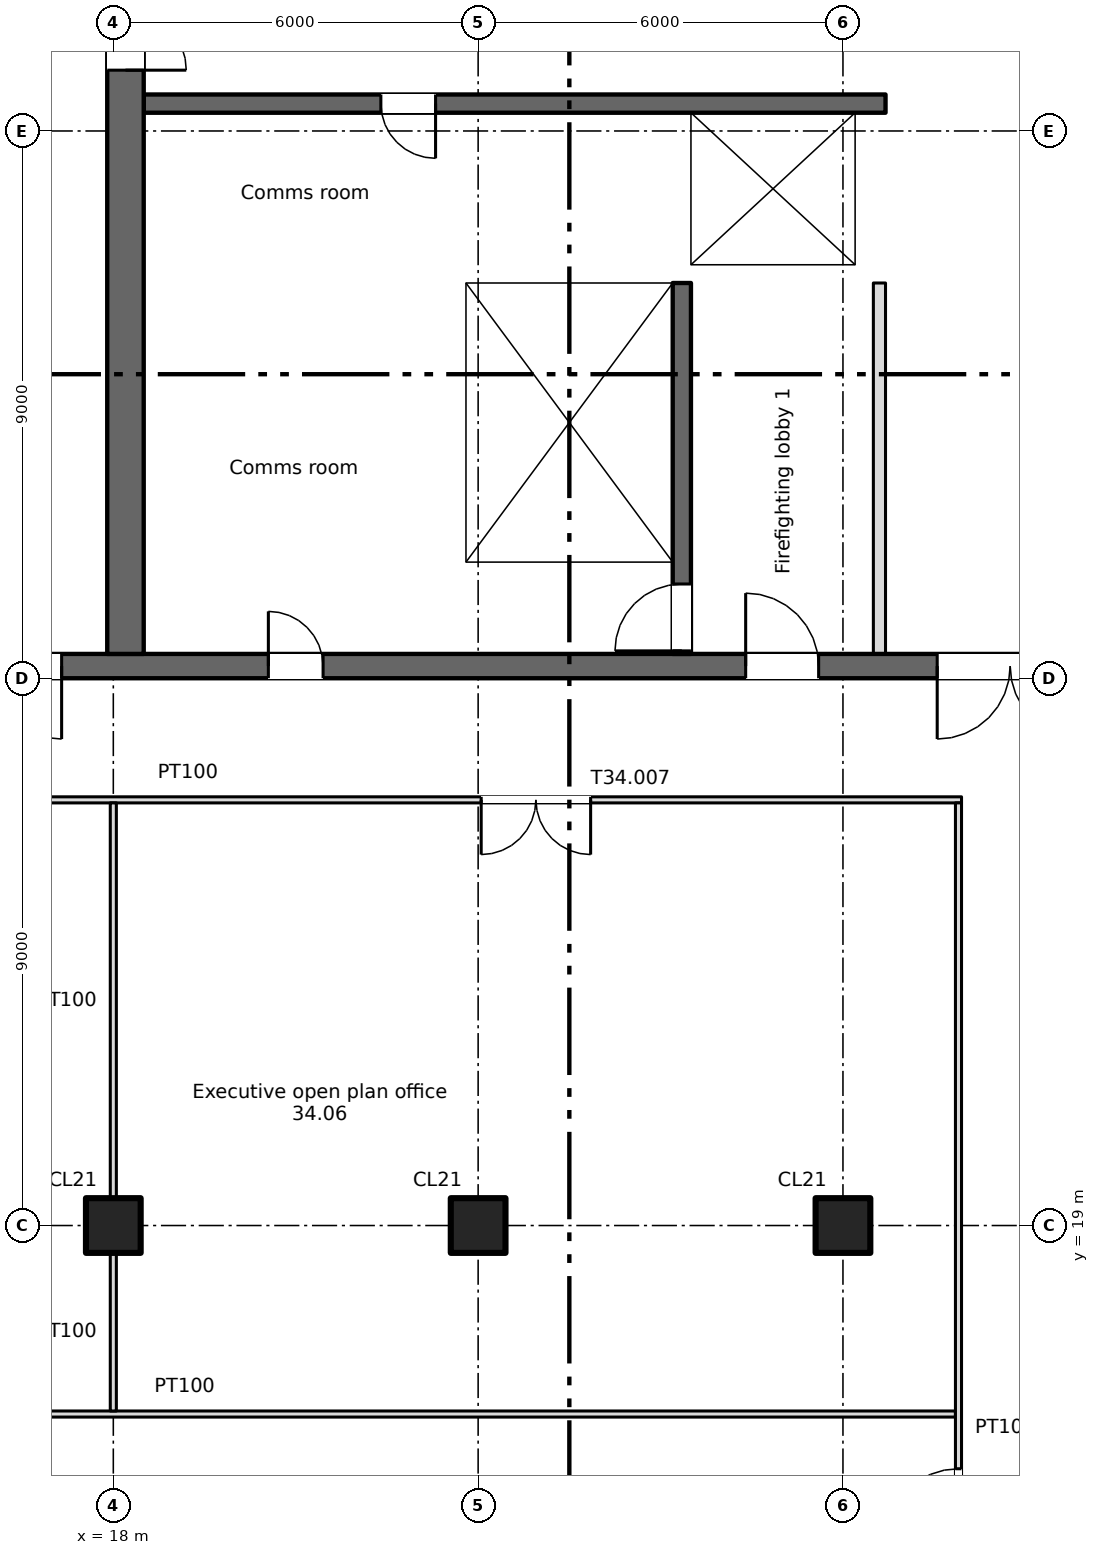
"""IFC4 building model, lengths in metres.
Left out: names, types, materials, properties, quantities, classifications, styles, units other than length and angle.
Written with IfcOpenShell. Run it as: python <this file> out.ifc"""

import sys

from ifc_helpers import new_model, si_unit, direction, frame, frame_2d, origin, origin_2d, place, context, subcontext, project, spatial, rectangle, extrude, element, fill, save


model = new_model("IFC4")
c1 = context("Model", 3, precision=1e-05, world=origin(), true_north=direction((0.0, 1.0)))
c2 = subcontext(c1, "Body", "Model", "MODEL_VIEW")
j1 = project(units=[si_unit("LENGTHUNIT", "METRE"), si_unit("PLANEANGLEUNIT", "RADIAN")], contexts=[c1])
p1 = place(None, origin())
s1 = spatial("IfcSite", under=j1, at=p1, CompositionType="ELEMENT")
p2 = place(p1, origin())
s2 = spatial("IfcBuilding", under=s1, at=p2, CompositionType="ELEMENT")
p3 = place(p2, frame((0.0, 0.0, 239.35)))
s3 = spatial("IfcBuildingStorey", under=s2, at=p3, CompositionType="ELEMENT", Elevation=239.35)
for number, where, z_axis, x_axis in (
    (1, (18.0, 19.0, 0.0), (0.0, 0.0, 1.0), (1.0, 0.0, 0.0)),
    (2, (24.0, 19.0, 0.0), (0.0, 0.0, 1.0), (1.0, 0.0, 0.0)),
    (3, (30.0, 19.0, 0.0), (0.0, 0.0, 1.0), (1.0, 0.0, 0.0)),
):
    element("IfcColumn", number, at=place(p3, frame(where, z_axis=z_axis, x_axis=x_axis)), inside=s3, PredefinedType="COLUMN", context=c2, shape_type="SweptSolid", body=[
        extrude(rectangle(XDim=0.9, YDim=0.9, at=origin_2d()), origin(), (0.0, 0.0, 1.0), 3.4),
    ])
p4 = place(p3, frame((6.5, 28.2, 0.0), z_axis=(0.0, 0.0, 1.0), x_axis=(1.0, 0.0, 0.0)))
e4 = element("IfcWall", 4, at=p4, inside=s3, PredefinedType="SHEAR", context=c2, shape_type="SweptSolid", body=[
    extrude(rectangle(XDim=58.0, YDim=0.4, at=frame_2d((29.0, 0.0))), origin(), (0.0, 0.0, 1.0), 3.4),
])
p5 = place(p4, frame((14.05, 0.0, 0.0)))
e5 = element("IfcOpeningElement", 5, at=p5, cuts=e4, PredefinedType="OPENING", context=c2, shape_type="SweptSolid", body=[
    extrude(rectangle(XDim=0.9, YDim=2.1, at=frame_2d((0.45, 1.05))), frame((0.0, 0.21, 0.0), z_axis=(0.0, -1.0, 0.0), x_axis=(1.0, 0.0, 0.0)), (0.0, 0.0, 1.0), 0.42),
])
p6 = place(p4, frame((48.762, 0.0, 0.0)))
e6 = element("IfcOpeningElement", 6, at=p6, cuts=e4, PredefinedType="OPENING", context=c2, shape_type="SweptSolid", body=[
    extrude(rectangle(XDim=0.9, YDim=2.1, at=frame_2d((0.45, 1.05))), frame((0.0, 0.21, 0.0), z_axis=(0.0, -1.0, 0.0), x_axis=(1.0, 0.0, 0.0)), (0.0, 0.0, 1.0), 0.42),
])
p7 = place(p4, frame((51.337, 0.0, 0.0)))
e7 = element("IfcOpeningElement", 7, at=p7, cuts=e4, PredefinedType="OPENING", context=c2, shape_type="SweptSolid", body=[
    extrude(rectangle(XDim=0.9, YDim=2.1, at=frame_2d((0.45, 1.05))), frame((0.0, 0.21, 0.0), z_axis=(0.0, -1.0, 0.0), x_axis=(1.0, 0.0, 0.0)), (0.0, 0.0, 1.0), 0.42),
])
p8 = place(p4, frame((1.55, 0.0, 0.0)))
e8 = element("IfcOpeningElement", 8, at=p8, cuts=e4, PredefinedType="OPENING", context=c2, shape_type="SweptSolid", body=[
    extrude(rectangle(XDim=0.9, YDim=2.1, at=frame_2d((0.45, 1.05))), frame((0.0, 0.21, 0.0), z_axis=(0.0, -1.0, 0.0), x_axis=(1.0, 0.0, 0.0)), (0.0, 0.0, 1.0), 0.42),
])
p9 = place(p4, frame((4.9, 0.0, 0.0)))
e9 = element("IfcOpeningElement", 9, at=p9, cuts=e4, PredefinedType="OPENING", context=c2, shape_type="SweptSolid", body=[
    extrude(rectangle(XDim=1.2, YDim=2.1, at=frame_2d((0.6, 1.05))), frame((0.0, 0.21, 0.0), z_axis=(0.0, -1.0, 0.0), x_axis=(1.0, 0.0, 0.0)), (0.0, 0.0, 1.0), 0.42),
])
p10 = place(p4, frame((31.9, 0.0, 0.0)))
e10 = element("IfcOpeningElement", 10, at=p10, cuts=e4, PredefinedType="OPENING", context=c2, shape_type="SweptSolid", body=[
    extrude(rectangle(XDim=1.2, YDim=2.1, at=frame_2d((0.6, 1.05))), frame((0.0, 0.21, 0.0), z_axis=(0.0, -1.0, 0.0), x_axis=(1.0, 0.0, 0.0)), (0.0, 0.0, 1.0), 0.42),
])
p11 = place(p4, frame((55.4, 0.0, 0.0)))
e11 = element("IfcOpeningElement", 11, at=p11, cuts=e4, PredefinedType="OPENING", context=c2, shape_type="SweptSolid", body=[
    extrude(rectangle(XDim=1.2, YDim=2.1, at=frame_2d((0.6, 1.05))), frame((0.0, 0.21, 0.0), z_axis=(0.0, -1.0, 0.0), x_axis=(1.0, 0.0, 0.0)), (0.0, 0.0, 1.0), 0.42),
])
p12 = place(p4, frame((21.9, 0.0, 0.0)))
e12 = element("IfcOpeningElement", 12, at=p12, cuts=e4, PredefinedType="OPENING", context=c2, shape_type="SweptSolid", body=[
    extrude(rectangle(XDim=1.2, YDim=2.1, at=frame_2d((0.6, 1.05))), frame((0.0, 0.21, 0.0), z_axis=(0.0, -1.0, 0.0), x_axis=(1.0, 0.0, 0.0)), (0.0, 0.0, 1.0), 0.42),
])
p13 = place(p4, frame((41.9, 0.0, 0.0)))
e13 = element("IfcOpeningElement", 13, at=p13, cuts=e4, PredefinedType="OPENING", context=c2, shape_type="SweptSolid", body=[
    extrude(rectangle(XDim=1.2, YDim=2.1, at=frame_2d((0.6, 1.05))), frame((0.0, 0.21, 0.0), z_axis=(0.0, -1.0, 0.0), x_axis=(1.0, 0.0, 0.0)), (0.0, 0.0, 1.0), 0.42),
])
p14 = place(p4, frame((25.05, 0.0, 0.0)))
e14 = element("IfcOpeningElement", 14, at=p14, cuts=e4, PredefinedType="OPENING", context=c2, shape_type="SweptSolid", body=[
    extrude(rectangle(XDim=2.4, YDim=2.1, at=frame_2d((1.2, 1.05))), frame((0.0, 0.21, 0.0), z_axis=(0.0, -1.0, 0.0), x_axis=(1.0, 0.0, 0.0)), (0.0, 0.0, 1.0), 0.42),
])
p15 = place(p4, frame((37.55, 0.0, 0.0)))
e15 = element("IfcOpeningElement", 15, at=p15, cuts=e4, PredefinedType="OPENING", context=c2, shape_type="SweptSolid", body=[
    extrude(rectangle(XDim=2.4, YDim=2.1, at=frame_2d((1.2, 1.05))), frame((0.0, 0.21, 0.0), z_axis=(0.0, -1.0, 0.0), x_axis=(1.0, 0.0, 0.0)), (0.0, 0.0, 1.0), 0.42),
])
p16 = place(p4, frame((8.25, 0.0, 0.0)))
e16 = element("IfcOpeningElement", 16, at=p16, cuts=e4, PredefinedType="OPENING", context=c2, shape_type="SweptSolid", body=[
    extrude(rectangle(XDim=2.4, YDim=2.1, at=frame_2d((1.2, 1.05))), frame((0.0, 0.21, 0.0), z_axis=(0.0, -1.0, 0.0), x_axis=(1.0, 0.0, 0.0)), (0.0, 0.0, 1.0), 0.42),
])
p17 = place(p4, frame((29.05, 0.0, 0.0)))
e17 = element("IfcOpeningElement", 17, at=p17, cuts=e4, PredefinedType="OPENING", context=c2, shape_type="SweptSolid", body=[
    extrude(rectangle(XDim=0.9, YDim=2.1, at=frame_2d((0.45, 1.05))), frame((0.0, 0.21, 0.0), z_axis=(0.0, -1.0, 0.0), x_axis=(1.0, 0.0, 0.0)), (0.0, 0.0, 1.0), 0.42),
])
p18 = place(p4, frame((35.05, 0.0, 0.0)))
e18 = element("IfcOpeningElement", 18, at=p18, cuts=e4, PredefinedType="OPENING", context=c2, shape_type="SweptSolid", body=[
    extrude(rectangle(XDim=0.9, YDim=2.1, at=frame_2d((0.45, 1.05))), frame((0.0, 0.21, 0.0), z_axis=(0.0, -1.0, 0.0), x_axis=(1.0, 0.0, 0.0)), (0.0, 0.0, 1.0), 0.42),
])
p19 = place(p3, frame((18.2, 28.4, 0.0), z_axis=(0.0, 0.0, 1.0), x_axis=(0.0, 1.0, 0.0)))
e19 = element("IfcWall", 19, at=p19, inside=s3, PredefinedType="SHEAR", context=c2, shape_type="SweptSolid", body=[
    extrude(rectangle(XDim=17.0, YDim=0.6, at=frame_2d((8.5, 0.0))), origin(), (0.0, 0.0, 1.0), 3.4),
])
p20 = place(p19, frame((9.6, 0.0, 0.0)))
e20 = element("IfcOpeningElement", 20, at=p20, cuts=e19, PredefinedType="OPENING", context=c2, shape_type="SweptSolid", body=[
    extrude(rectangle(XDim=2.0, YDim=2.1, at=frame_2d((1.0, 1.05))), frame((0.0, 0.31, 0.0), z_axis=(0.0, -1.0, 0.0), x_axis=(1.0, 0.0, 0.0)), (0.0, 0.0, 1.0), 0.62),
])
p21 = place(p19, frame((15.45, 0.0, 0.0)))
e21 = element("IfcOpeningElement", 21, at=p21, cuts=e19, PredefinedType="OPENING", context=c2, shape_type="SweptSolid", body=[
    extrude(rectangle(XDim=1.2, YDim=2.1, at=frame_2d((0.6, 1.05))), frame((0.0, 0.31, 0.0), z_axis=(0.0, -1.0, 0.0), x_axis=(1.0, 0.0, 0.0)), (0.0, 0.0, 1.0), 0.62),
])
p22 = place(p3, frame((23.65, 28.4, 0.0), z_axis=(0.0, 0.0, 1.0), x_axis=(0.0, 1.0, 0.0)))
e22 = element("IfcWall", 22, at=p22, inside=s3, PredefinedType="SHEAR", context=c2, shape_type="SweptSolid", body=[
    extrude(rectangle(XDim=6.1, YDim=0.3, at=frame_2d((3.05, 0.0))), origin(), (0.0, 0.0, 1.0), 3.4),
])
p23 = place(p3, frame((27.35, 28.4, 0.0), z_axis=(0.0, 0.0, 1.0), x_axis=(0.0, 1.0, 0.0)))
e23 = element("IfcWall", 23, at=p23, inside=s3, PredefinedType="SHEAR", context=c2, shape_type="SweptSolid", body=[
    extrude(rectangle(XDim=6.1, YDim=0.3, at=frame_2d((3.05, 0.0))), origin(), (0.0, 0.0, 1.0), 3.4),
])
p24 = place(p23, frame((0.05, 0.0, 0.0)))
e24 = element("IfcOpeningElement", 24, at=p24, cuts=e23, PredefinedType="OPENING", context=c2, shape_type="SweptSolid", body=[
    extrude(rectangle(XDim=1.1, YDim=2.1, at=frame_2d((0.55, 1.05))), frame((0.0, 0.16, 0.0), z_axis=(0.0, -1.0, 0.0), x_axis=(1.0, 0.0, 0.0)), (0.0, 0.0, 1.0), 0.32),
])
p25 = place(p3, frame((18.5, 34.65, 0.0), z_axis=(0.0, 0.0, 1.0), x_axis=(1.0, 0.0, 0.0)))
e25 = element("IfcWall", 25, at=p25, inside=s3, PredefinedType="SHEAR", context=c2, shape_type="SweptSolid", body=[
    extrude(rectangle(XDim=12.2, YDim=0.3, at=frame_2d((6.1, 0.0))), origin(), (0.0, 0.0, 1.0), 3.4),
])
p26 = place(p25, frame((9.8, 0.0, 0.0)))
e26 = element("IfcOpeningElement", 26, at=p26, cuts=e25, PredefinedType="OPENING", context=c2, shape_type="SweptSolid", body=[
    extrude(rectangle(XDim=1.1, YDim=2.1, at=frame_2d((0.55, 1.05))), frame((0.0, 0.16, 0.0), z_axis=(0.0, -1.0, 0.0), x_axis=(1.0, 0.0, 0.0)), (0.0, 0.0, 1.0), 0.32),
])
p27 = place(p3, frame((30.7, 37.45, 0.0), z_axis=(0.0, 0.0, 1.0), x_axis=(-1.0, 0.0, 0.0)))
e27 = element("IfcWall", 27, at=p27, inside=s3, PredefinedType="SHEAR", context=c2, shape_type="SweptSolid", body=[
    extrude(rectangle(XDim=12.2, YDim=0.3, at=frame_2d((6.1, 0.0))), origin(), (0.0, 0.0, 1.0), 3.4),
])
p28 = place(p27, frame((7.4, 0.0, 0.0)))
e28 = element("IfcOpeningElement", 28, at=p28, cuts=e27, PredefinedType="OPENING", context=c2, shape_type="SweptSolid", body=[
    extrude(rectangle(XDim=0.9, YDim=2.1, at=frame_2d((0.45, 1.05))), frame((0.0, 0.16, 0.0), z_axis=(0.0, -1.0, 0.0), x_axis=(1.0, 0.0, 0.0)), (0.0, 0.0, 1.0), 0.32),
])
p29 = place(p3, frame((27.35, 34.8, 0.0), z_axis=(0.0, 0.0, 1.0), x_axis=(0.0, 1.0, 0.0)))
e29 = element("IfcWall", 29, at=p29, inside=s3, PredefinedType="SHEAR", context=c2, shape_type="SweptSolid", body=[
    extrude(rectangle(XDim=2.5, YDim=0.3, at=frame_2d((1.25, 0.0))), origin(), (0.0, 0.0, 1.0), 3.4),
])
p30 = place(p3, frame((30.45, 34.8, 0.0), z_axis=(0.0, 0.0, 1.0), x_axis=(0.0, 1.0, 0.0)))
e30 = element("IfcWall", 30, at=p30, inside=s3, PredefinedType="SHEAR", context=c2, shape_type="SweptSolid", body=[
    extrude(rectangle(XDim=2.5, YDim=0.5, at=frame_2d((1.25, 0.0))), origin(), (0.0, 0.0, 1.0), 3.4),
])
p31 = place(p3, frame((30.6, 28.4, 0.0), z_axis=(0.0, 0.0, 1.0), x_axis=(0.0, 1.0, 0.0)))
e31 = element("IfcWall", 31, at=p31, inside=s3, PredefinedType="PARTITIONING", context=c2, shape_type="SweptSolid", body=[
    extrude(rectangle(XDim=6.1, YDim=0.2, at=frame_2d((3.05, 0.0))), origin(), (0.0, 0.0, 1.0), 3.4),
])
p32 = place(p3, frame((6.5, 15.9, 0.0), z_axis=(0.0, 0.0, 1.0), x_axis=(1.0, 0.0, 0.0)))
e32 = element("IfcWall", 32, at=p32, inside=s3, PredefinedType="PARTITIONING", context=c2, shape_type="SweptSolid", body=[
    extrude(rectangle(XDim=25.35, YDim=0.1, at=frame_2d((12.675, 0.0))), origin(), (0.0, 0.0, 1.0), 3.4),
])
p33 = place(p3, frame((6.5, 26.0, 0.0), z_axis=(0.0, 0.0, 1.0), x_axis=(1.0, 0.0, 0.0)))
e33 = element("IfcWall", 33, at=p33, inside=s3, PredefinedType="PARTITIONING", context=c2, shape_type="SweptSolid", body=[
    extrude(rectangle(XDim=25.45, YDim=0.1, at=frame_2d((12.725, 0.0))), origin(), (0.0, 0.0, 1.0), 3.4),
])
p34 = place(p33, frame((17.55, 0.0, 0.0)))
e34 = element("IfcOpeningElement", 34, at=p34, cuts=e33, PredefinedType="OPENING", context=c2, shape_type="SweptSolid", body=[
    extrude(rectangle(XDim=1.8, YDim=2.1, at=frame_2d((0.9, 1.05))), frame((0.0, 0.06, 0.0), z_axis=(0.0, -1.0, 0.0), x_axis=(1.0, 0.0, 0.0)), (0.0, 0.0, 1.0), 0.12),
])
p35 = place(p33, frame((4.85, 0.0, 0.0)))
e35 = element("IfcOpeningElement", 35, at=p35, cuts=e33, PredefinedType="OPENING", context=c2, shape_type="SweptSolid", body=[
    extrude(rectangle(XDim=1.8, YDim=2.1, at=frame_2d((0.9, 1.05))), frame((0.0, 0.06, 0.0), z_axis=(0.0, -1.0, 0.0), x_axis=(1.0, 0.0, 0.0)), (0.0, 0.0, 1.0), 0.12),
])
p36 = place(p3, frame((18.0, 15.95, 0.0), z_axis=(0.0, 0.0, 1.0), x_axis=(0.0, 1.0, 0.0)))
e36 = element("IfcWall", 36, at=p36, inside=s3, PredefinedType="PARTITIONING", context=c2, shape_type="SweptSolid", body=[
    extrude(rectangle(XDim=2.6, YDim=0.1, at=frame_2d((1.3, 0.0))), origin(), (0.0, 0.0, 1.0), 3.4),
])
p37 = place(p3, frame((18.0, 19.45, 0.0), z_axis=(0.0, 0.0, 1.0), x_axis=(0.0, 1.0, 0.0)))
e37 = element("IfcWall", 37, at=p37, inside=s3, PredefinedType="PARTITIONING", context=c2, shape_type="SweptSolid", body=[
    extrude(rectangle(XDim=6.5, YDim=0.1, at=frame_2d((3.25, 0.0))), origin(), (0.0, 0.0, 1.0), 3.4),
])
p38 = place(p3, frame((31.9, 5.4, 0.0), z_axis=(0.0, 0.0, 1.0), x_axis=(0.0, 1.0, 0.0)))
e38 = element("IfcWall", 38, at=p38, inside=s3, PredefinedType="PARTITIONING", context=c2, shape_type="SweptSolid", body=[
    extrude(rectangle(XDim=20.55, YDim=0.1, at=frame_2d((10.275, 0.0))), origin(), (0.0, 0.0, 1.0), 3.4),
])
p39 = place(p38, frame((1.35, 0.0, 0.0)))
e39 = element("IfcOpeningElement", 39, at=p39, cuts=e38, PredefinedType="OPENING", context=c2, shape_type="SweptSolid", body=[
    extrude(rectangle(XDim=1.8, YDim=2.1, at=frame_2d((0.9, 1.05))), frame((0.0, 0.06, 0.0), z_axis=(0.0, -1.0, 0.0), x_axis=(1.0, 0.0, 0.0)), (0.0, 0.0, 1.0), 0.12),
])
p40 = place(p38, frame((5.4, 0.0, 0.0)))
e40 = element("IfcOpeningElement", 40, at=p40, cuts=e38, PredefinedType="OPENING", context=c2, shape_type="SweptSolid", body=[
    extrude(rectangle(XDim=1.2, YDim=2.1, at=frame_2d((0.6, 1.05))), frame((0.0, 0.06, 0.0), z_axis=(0.0, -1.0, 0.0), x_axis=(1.0, 0.0, 0.0)), (0.0, 0.0, 1.0), 0.12),
])
p41 = place(p38, frame((8.4, 0.0, 0.0)))
e41 = element("IfcOpeningElement", 41, at=p41, cuts=e38, PredefinedType="OPENING", context=c2, shape_type="SweptSolid", body=[
    extrude(rectangle(XDim=1.2, YDim=2.1, at=frame_2d((0.6, 1.05))), frame((0.0, 0.06, 0.0), z_axis=(0.0, -1.0, 0.0), x_axis=(1.0, 0.0, 0.0)), (0.0, 0.0, 1.0), 0.12),
])
p42 = place(p5, origin())
e42 = element("IfcDoor", 42, at=p42, inside=s3, OperationType="SINGLE_SWING_LEFT", PredefinedType="DOOR", context=c2, shape_type="SweptSolid", body=[
    extrude(rectangle(XDim=0.9, YDim=2.1, at=frame_2d((0.45, 1.05))), frame((0.0, 0.025, 0.0), z_axis=(0.0, -1.0, 0.0), x_axis=(1.0, 0.0, 0.0)), (0.0, 0.0, 1.0), 0.05),
])
fill(e5, e42)
p43 = place(p28, origin())
e43 = element("IfcDoor", 43, at=p43, inside=s3, OperationType="SINGLE_SWING_LEFT", PredefinedType="DOOR", context=c2, shape_type="SweptSolid", body=[
    extrude(rectangle(XDim=0.9, YDim=2.1, at=frame_2d((0.45, 1.05))), frame((0.0, 0.025, 0.0), z_axis=(0.0, -1.0, 0.0), x_axis=(1.0, 0.0, 0.0)), (0.0, 0.0, 1.0), 0.05),
])
fill(e28, e43)
p44 = place(p26, origin())
e44 = element("IfcDoor", 44, at=p44, inside=s3, OperationType="SLIDING_TO_LEFT", PredefinedType="DOOR", context=c2, shape_type="SweptSolid", body=[
    extrude(rectangle(XDim=1.1, YDim=2.1, at=frame_2d((0.55, 1.05))), frame((0.0, 0.025, 0.0), z_axis=(0.0, -1.0, 0.0), x_axis=(1.0, 0.0, 0.0)), (0.0, 0.0, 1.0), 0.05),
])
fill(e26, e44)
p45 = place(p24, origin())
e45 = element("IfcDoor", 45, at=p45, inside=s3, OperationType="SINGLE_SWING_LEFT", PredefinedType="DOOR", context=c2, shape_type="SweptSolid", body=[
    extrude(rectangle(XDim=1.1, YDim=2.1, at=frame_2d((0.55, 1.05))), frame((0.0, 0.025, 0.0), z_axis=(0.0, -1.0, 0.0), x_axis=(1.0, 0.0, 0.0)), (0.0, 0.0, 1.0), 0.05),
])
fill(e24, e45)
p46 = place(p12, origin())
e46 = element("IfcDoor", 46, at=p46, inside=s3, OperationType="SINGLE_SWING_LEFT", PredefinedType="DOOR", context=c2, shape_type="SweptSolid", body=[
    extrude(rectangle(XDim=1.2, YDim=2.1, at=frame_2d((0.6, 1.05))), frame((0.0, 0.025, 0.0), z_axis=(0.0, -1.0, 0.0), x_axis=(1.0, 0.0, 0.0)), (0.0, 0.0, 1.0), 0.05),
])
fill(e12, e46)
p47 = place(p14, origin())
e47 = element("IfcDoor", 47, at=p47, inside=s3, OperationType="DOUBLE_DOOR_SINGLE_SWING", PredefinedType="DOOR", context=c2, shape_type="SweptSolid", body=[
    extrude(rectangle(XDim=2.4, YDim=2.1, at=frame_2d((1.2, 1.05))), frame((0.0, 0.025, 0.0), z_axis=(0.0, -1.0, 0.0), x_axis=(1.0, 0.0, 0.0)), (0.0, 0.0, 1.0), 0.05),
])
fill(e14, e47)
p48 = place(p16, origin())
e48 = element("IfcDoor", 48, at=p48, inside=s3, OperationType="DOUBLE_DOOR_SINGLE_SWING", PredefinedType="DOOR", context=c2, shape_type="SweptSolid", body=[
    extrude(rectangle(XDim=2.4, YDim=2.1, at=frame_2d((1.2, 1.05))), frame((0.0, 0.025, 0.0), z_axis=(0.0, -1.0, 0.0), x_axis=(1.0, 0.0, 0.0)), (0.0, 0.0, 1.0), 0.05),
])
fill(e16, e48)
p49 = place(p20, origin())
e49 = element("IfcDoor", 49, at=p49, inside=s3, OperationType="DOUBLE_DOOR_SINGLE_SWING", PredefinedType="DOOR", context=c2, shape_type="SweptSolid", body=[
    extrude(rectangle(XDim=2.0, YDim=2.1, at=frame_2d((1.0, 1.05))), frame((0.0, 0.025, 0.0), z_axis=(0.0, -1.0, 0.0), x_axis=(1.0, 0.0, 0.0)), (0.0, 0.0, 1.0), 0.05),
])
fill(e20, e49)
p50 = place(p41, origin())
e50 = element("IfcDoor", 50, at=p50, inside=s3, OperationType="SINGLE_SWING_LEFT", PredefinedType="DOOR", context=c2, shape_type="SweptSolid", body=[
    extrude(rectangle(XDim=1.2, YDim=2.1, at=frame_2d((0.6, 1.05))), frame((0.0, 0.025, 0.0), z_axis=(0.0, -1.0, 0.0), x_axis=(1.0, 0.0, 0.0)), (0.0, 0.0, 1.0), 0.05),
])
fill(e41, e50)
p51 = place(p34, origin())
e51 = element("IfcDoor", 51, at=p51, inside=s3, OperationType="DOUBLE_DOOR_SINGLE_SWING", PredefinedType="DOOR", context=c2, shape_type="SweptSolid", body=[
    extrude(rectangle(XDim=1.8, YDim=2.1, at=frame_2d((0.9, 1.05))), frame((0.0, 0.025, 0.0), z_axis=(0.0, -1.0, 0.0), x_axis=(1.0, 0.0, 0.0)), (0.0, 0.0, 1.0), 0.05),
])
fill(e34, e51)
save(model, sys.argv[1])
